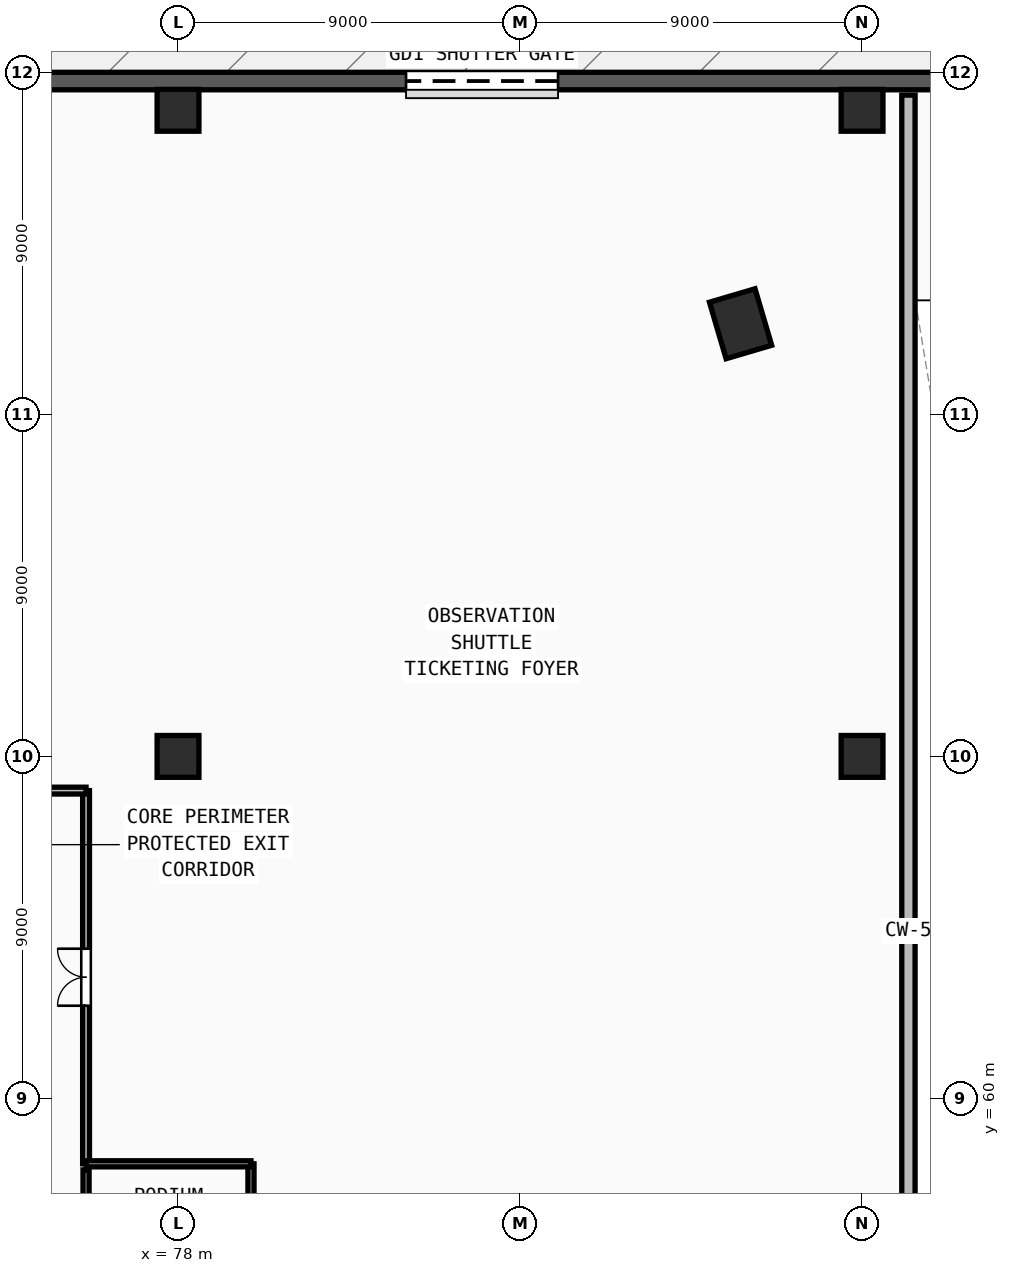
"""IFC4 building model, lengths in metres.
Left out: names, types, materials, properties, quantities, classifications, styles, units other than length and angle.
Written with IfcOpenShell. Run it as: python <this file> out.ifc"""

import sys

from ifc_helpers import new_model, si_unit, direction, frame, frame_2d, origin, origin_2d, place, context, subcontext, project, spatial, rectangle, extrude, source, transform, mapped, element, fill, save


model = new_model("IFC4")
c1 = context("Model", 3, precision=1e-05, world=origin(), true_north=direction((0.0, 1.0)))
c2 = subcontext(c1, "Body", "Model", "MODEL_VIEW")
j1 = project(units=[si_unit("LENGTHUNIT", "METRE"), si_unit("PLANEANGLEUNIT", "RADIAN")], contexts=[c1])
p1 = place(None, origin())
s1 = spatial("IfcSite", under=j1, at=p1, CompositionType="ELEMENT")
p2 = place(p1, origin())
s2 = spatial("IfcBuilding", under=s1, at=p2, CompositionType="ELEMENT")
p3 = place(p2, origin())
s3 = spatial("IfcBuildingStorey", under=s2, at=p3, CompositionType="ELEMENT", Elevation=0.0)
m1 = source(origin(), c2, "Body", "SweptSolid", [
    extrude(rectangle(XDim=1.55, YDim=1.25, at=origin_2d()), origin(), (0.0, 0.0, 1.0), 5.4),
])
p4 = place(p3, frame((92.803, 80.384, 0.0), z_axis=(0.0, 0.0, 1.0), x_axis=(-0.282676303383, 0.959215360337, 0.0)))
e1 = element("IfcColumn", 1, at=p4, inside=s3, PredefinedType="COLUMN", context=c2, shape_type="MappedRepresentation", body=[
    mapped(m1, transform((0.0, 0.0, 0.0), x_axis=(1.0, 0.0, 0.0), y_axis=(0.0, 1.0, 0.0), z_axis=(0.0, 0.0, 1.0), scale=1.0)),
])
m2 = source(origin(), c2, "Body", "SweptSolid", [
    extrude(rectangle(XDim=1.1, YDim=1.1, at=origin_2d()), origin(), (0.0, 0.0, 1.0), 5.4),
])
for number, where, z_axis, x_axis in (
    (2, (78.0, 69.0, 0.0), (0.0, 0.0, 1.0), (1.0, 0.0, 0.0)),
    (3, (96.0, 69.0, 0.0), (0.0, 0.0, 1.0), (1.0, 0.0, 0.0)),
    (4, (78.0, 86.0, 0.0), (0.0, 0.0, 1.0), (1.0, 0.0, 0.0)),
    (5, (96.0, 86.0, 0.0), (0.0, 0.0, 1.0), (1.0, 0.0, 0.0)),
):
    element("IfcColumn", number, at=place(p3, frame(where, z_axis=z_axis, x_axis=x_axis)), inside=s3, PredefinedType="COLUMN", context=c2, shape_type="MappedRepresentation", body=[
        mapped(m2, transform((0.0, 0.0, 0.0), x_axis=(1.0, 0.0, 0.0), y_axis=(0.0, 1.0, 0.0), z_axis=(0.0, 0.0, 1.0), scale=1.0)),
    ])
p5 = place(p3, frame((104.77, 86.77, 0.0), z_axis=(0.0, 0.0, 1.0), x_axis=(-1.0, 0.0, 0.0)))
e6 = element("IfcWall", 6, at=p5, inside=s3, PredefinedType="SOLIDWALL", context=c2, shape_type="SweptSolid", body=[
    extrude(rectangle(XDim=89.54, YDim=0.46, at=frame_2d((44.77, 0.0))), origin(), (0.0, 0.0, 1.0), 5.15),
])
m3 = source(origin(), c2, "Body", "SweptSolid", [
    extrude(rectangle(XDim=2.1, YDim=2.4, at=frame_2d((1.05, 1.2))), frame((0.0, 0.24, 0.0), z_axis=(0.0, -1.0, 0.0), x_axis=(1.0, 0.0, 0.0)), (0.0, 0.0, 1.0), 0.48),
])
p6 = place(p5, frame((49.42, 0.0, 0.0)))
e7 = element("IfcOpeningElement", 7, at=p6, cuts=e6, PredefinedType="OPENING", context=c2, shape_type="MappedRepresentation", body=[
    mapped(m3, transform((0.0, 0.0, 0.0), x_axis=(1.0, 0.0, 0.0), y_axis=(0.0, 1.0, 0.0), z_axis=(0.0, 0.0, 1.0), scale=1.0)),
])
p7 = place(p5, frame((83.17, 0.0, 0.0)))
e8 = element("IfcOpeningElement", 8, at=p7, cuts=e6, PredefinedType="OPENING", context=c2, shape_type="MappedRepresentation", body=[
    mapped(m3, transform((0.0, 0.0, 0.0), x_axis=(1.0, 0.0, 0.0), y_axis=(0.0, 1.0, 0.0), z_axis=(0.0, 0.0, 1.0), scale=1.0)),
])
p8 = place(p5, frame((44.17, 0.0, 0.0)))
e9 = element("IfcOpeningElement", 9, at=p8, cuts=e6, PredefinedType="OPENING", context=c2, shape_type="MappedRepresentation", body=[
    mapped(m3, transform((0.0, 0.0, 0.0), x_axis=(1.0, 0.0, 0.0), y_axis=(0.0, 1.0, 0.0), z_axis=(0.0, 0.0, 1.0), scale=1.0)),
])
m4 = source(origin(), c2, "Body", "SweptSolid", [
    extrude(rectangle(XDim=4.0, YDim=3.8, at=frame_2d((2.0, 1.9))), frame((0.0, 0.24, 0.0), z_axis=(0.0, -1.0, 0.0), x_axis=(1.0, 0.0, 0.0)), (0.0, 0.0, 1.0), 0.48),
])
p9 = place(p5, frame((72.77, 0.0, 0.0)))
e10 = element("IfcOpeningElement", 10, at=p9, cuts=e6, PredefinedType="OPENING", context=c2, shape_type="MappedRepresentation", body=[
    mapped(m4, transform((0.0, 0.0, 0.0), x_axis=(1.0, 0.0, 0.0), y_axis=(0.0, 1.0, 0.0), z_axis=(0.0, 0.0, 1.0), scale=1.0)),
])
p10 = place(p5, frame((59.77, 0.0, 0.0)))
e11 = element("IfcOpeningElement", 11, at=p10, cuts=e6, PredefinedType="OPENING", context=c2, shape_type="MappedRepresentation", body=[
    mapped(m4, transform((0.0, 0.0, 0.0), x_axis=(1.0, 0.0, 0.0), y_axis=(0.0, 1.0, 0.0), z_axis=(0.0, 0.0, 1.0), scale=1.0)),
])
p11 = place(p5, frame((35.77, 0.0, 0.0)))
e12 = element("IfcOpeningElement", 12, at=p11, cuts=e6, PredefinedType="OPENING", context=c2, shape_type="MappedRepresentation", body=[
    mapped(m4, transform((0.0, 0.0, 0.0), x_axis=(1.0, 0.0, 0.0), y_axis=(0.0, 1.0, 0.0), z_axis=(0.0, 0.0, 1.0), scale=1.0)),
])
p12 = place(p5, frame((16.77, 0.0, 0.0)))
e13 = element("IfcOpeningElement", 13, at=p12, cuts=e6, PredefinedType="OPENING", context=c2, shape_type="MappedRepresentation", body=[
    mapped(m4, transform((0.0, 0.0, 0.0), x_axis=(1.0, 0.0, 0.0), y_axis=(0.0, 1.0, 0.0), z_axis=(0.0, 0.0, 1.0), scale=1.0)),
])
p13 = place(p5, frame((2.27, 0.0, 0.0)))
e14 = element("IfcOpeningElement", 14, at=p13, cuts=e6, PredefinedType="OPENING", context=c2, shape_type="MappedRepresentation", body=[
    mapped(m4, transform((0.0, 0.0, 0.0), x_axis=(1.0, 0.0, 0.0), y_axis=(0.0, 1.0, 0.0), z_axis=(0.0, 0.0, 1.0), scale=1.0)),
])
p14 = place(p3, frame((97.22, 42.42, 0.0), z_axis=(0.0, 0.0, 1.0), x_axis=(0.0, 1.0, 0.0)))
e15 = element("IfcWall", 15, at=p14, inside=s3, PredefinedType="SOLIDWALL", context=c2, shape_type="SweptSolid", body=[
    extrude(rectangle(XDim=43.98, YDim=0.35, at=frame_2d((21.99, 0.0))), origin(), (0.0, 0.0, 1.0), 5.15),
])
p15 = place(p3, frame((75.58, 55.28, 0.0), z_axis=(0.0, 0.0, 1.0), x_axis=(0.0, 1.0, 0.0)))
e16 = element("IfcWall", 16, at=p15, inside=s3, PredefinedType="PARTITIONING", context=c2, shape_type="SweptSolid", body=[
    extrude(rectangle(XDim=2.84, YDim=0.16, at=frame_2d((1.42, 0.0))), origin(), (0.0, 0.0, 1.0), 5.15),
])
m5 = source(origin(), c2, "Body", "SweptSolid", [
    extrude(rectangle(XDim=1.05, YDim=2.15, at=frame_2d((0.525, 1.075))), frame((0.0, 0.09, 0.0), z_axis=(0.0, -1.0, 0.0), x_axis=(1.0, 0.0, 0.0)), (0.0, 0.0, 1.0), 0.18),
])
p16 = place(p15, frame((0.895, 0.0, 0.0)))
e17 = element("IfcOpeningElement", 17, at=p16, cuts=e16, PredefinedType="OPENING", context=c2, shape_type="MappedRepresentation", body=[
    mapped(m5, transform((0.0, 0.0, 0.0), x_axis=(1.0, 0.0, 0.0), y_axis=(0.0, 1.0, 0.0), z_axis=(0.0, 0.0, 1.0), scale=1.0)),
])
p17 = place(p3, frame((75.58, 58.28, 0.0), z_axis=(0.0, 0.0, 1.0), x_axis=(0.0, 1.0, 0.0)))
e18 = element("IfcWall", 18, at=p17, inside=s3, PredefinedType="PARTITIONING", context=c2, shape_type="SweptSolid", body=[
    extrude(rectangle(XDim=9.82, YDim=0.18, at=frame_2d((4.91, 0.0))), origin(), (0.0, 0.0, 1.0), 5.15),
])
m6 = source(origin(), c2, "Body", "SweptSolid", [
    extrude(rectangle(XDim=1.5, YDim=2.2, at=frame_2d((0.75, 1.1))), frame((0.0, 0.1, 0.0), z_axis=(0.0, -1.0, 0.0), x_axis=(1.0, 0.0, 0.0)), (0.0, 0.0, 1.0), 0.2),
])
p18 = place(p17, frame((4.16, 0.0, 0.0)))
e19 = element("IfcOpeningElement", 19, at=p18, cuts=e18, PredefinedType="OPENING", context=c2, shape_type="MappedRepresentation", body=[
    mapped(m6, transform((0.0, 0.0, 0.0), x_axis=(1.0, 0.0, 0.0), y_axis=(0.0, 1.0, 0.0), z_axis=(0.0, 0.0, 1.0), scale=1.0)),
])
p19 = place(p3, frame((79.92, 47.92, 0.0), z_axis=(0.0, 0.0, 1.0), x_axis=(0.0, 1.0, 0.0)))
e20 = element("IfcWall", 20, at=p19, inside=s3, PredefinedType="PARTITIONING", context=c2, shape_type="SweptSolid", body=[
    extrude(rectangle(XDim=10.36, YDim=0.16, at=frame_2d((5.18, 0.0))), origin(), (0.0, 0.0, 1.0), 5.15),
])
p20 = place(p3, frame((75.58, 58.28, 0.0), z_axis=(0.0, 0.0, 1.0), x_axis=(1.0, 0.0, 0.0)))
e21 = element("IfcWall", 21, at=p20, inside=s3, PredefinedType="PARTITIONING", context=c2, shape_type="SweptSolid", body=[
    extrude(rectangle(XDim=4.34, YDim=0.16, at=frame_2d((2.17, 0.0))), origin(), (0.0, 0.0, 1.0), 5.15),
])
p21 = place(p3, frame((71.7, 68.1, 0.0), z_axis=(0.0, 0.0, 1.0), x_axis=(1.0, 0.0, 0.0)))
e22 = element("IfcWall", 22, at=p21, inside=s3, PredefinedType="PARTITIONING", context=c2, shape_type="SweptSolid", body=[
    extrude(rectangle(XDim=3.88, YDim=0.18, at=frame_2d((1.94, 0.0))), origin(), (0.0, 0.0, 1.0), 5.15),
])
m7 = source(origin(), c2, "Body", "SweptSolid", [
    extrude(rectangle(XDim=4.0, YDim=3.8, at=frame_2d((2.0, 1.9))), frame((0.0, 0.025, 0.0), z_axis=(0.0, -1.0, 0.0), x_axis=(1.0, 0.0, 0.0)), (0.0, 0.0, 1.0), 0.05),
])
p22 = place(p12, origin())
e23 = element("IfcDoor", 23, at=p22, inside=s3, OperationType="ROLLINGUP", PredefinedType="GATE", context=c2, shape_type="MappedRepresentation", body=[
    mapped(m7, transform((0.0, 0.0, 0.0), x_axis=(1.0, 0.0, 0.0), y_axis=(0.0, 1.0, 0.0), z_axis=(0.0, 0.0, 1.0), scale=1.0)),
])
fill(e13, e23)
m8 = source(origin(), c2, "Body", "SweptSolid", [
    extrude(rectangle(XDim=1.5, YDim=2.2, at=frame_2d((0.75, 1.1))), frame((0.0, 0.025, 0.0), z_axis=(0.0, -1.0, 0.0), x_axis=(1.0, 0.0, 0.0)), (0.0, 0.0, 1.0), 0.05),
])
p23 = place(p18, origin())
e24 = element("IfcDoor", 24, at=p23, inside=s3, OperationType="DOUBLE_DOOR_SINGLE_SWING", PredefinedType="DOOR", context=c2, shape_type="MappedRepresentation", body=[
    mapped(m8, transform((0.0, 0.0, 0.0), x_axis=(1.0, 0.0, 0.0), y_axis=(0.0, 1.0, 0.0), z_axis=(0.0, 0.0, 1.0), scale=1.0)),
])
fill(e19, e24)
save(model, sys.argv[1])
